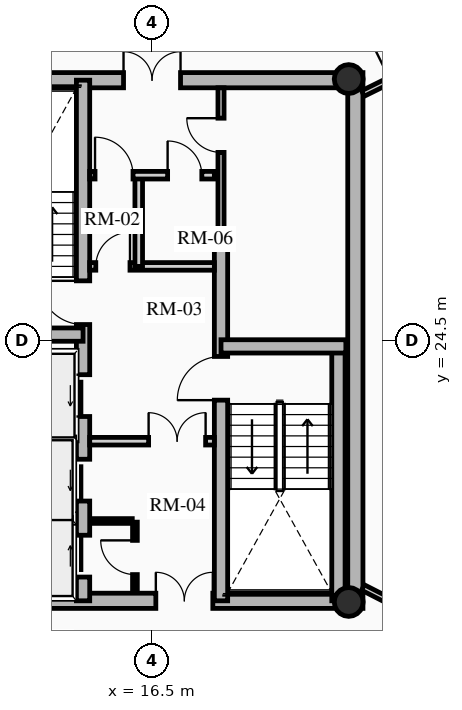
"""IFC4 building model, lengths in metres.
Left out: names, types, materials, properties, quantities, classifications, styles, units other than length and angle.
Written with IfcOpenShell. Run it as: python <this file> out.ifc"""

import sys

from ifc_helpers import new_model, si_unit, direction, frame, frame_2d, origin, origin_2d, place, context, subcontext, project, spatial, rectangle, hollow_circle, extrude, source, transform, mapped, element, fill, save


model = new_model("IFC4")
c1 = context("Model", 3, precision=1e-05, world=origin(), true_north=direction((0.0, 1.0)))
c2 = subcontext(c1, "Body", "Model", "MODEL_VIEW")
j1 = project(units=[si_unit("LENGTHUNIT", "METRE"), si_unit("PLANEANGLEUNIT", "RADIAN")], contexts=[c1])
p1 = place(None, origin())
s1 = spatial("IfcSite", under=j1, at=p1, CompositionType="ELEMENT")
p2 = place(p1, origin())
s2 = spatial("IfcBuilding", under=s1, at=p2, CompositionType="ELEMENT")
p3 = place(p2, frame((0.0, 0.0, 160.33)))
s3 = spatial("IfcBuildingStorey", under=s2, at=p3, CompositionType="ELEMENT", Elevation=160.33)
p4 = place(p3, frame((21.85, 17.45, 0.0), z_axis=(0.0, 0.0, 1.0), x_axis=(0.0, 1.0, 0.0)))
e1 = element("IfcWall", 1, at=p4, inside=s3, PredefinedType="SHEAR", context=c2, shape_type="SweptSolid", body=[
    extrude(rectangle(XDim=14.1, YDim=0.4, at=frame_2d((7.05, 0.0))), origin(), (0.0, 0.0, 1.0), 2.91),
])
p5 = place(p3, frame((11.15, 17.65, 0.0), z_axis=(0.0, 0.0, 1.0), x_axis=(1.0, 0.0, 0.0)))
e2 = element("IfcWall", 2, at=p5, inside=s3, PredefinedType="SHEAR", context=c2, shape_type="SweptSolid", body=[
    extrude(rectangle(XDim=10.7, YDim=0.4, at=frame_2d((5.35, 0.0))), origin(), (0.0, 0.0, 1.0), 2.91),
])
m1 = source(origin(), c2, "Body", "SweptSolid", [
    extrude(rectangle(XDim=1.5, YDim=2.02, at=frame_2d((0.75, 1.01))), frame((0.0, 0.21, 0.0), z_axis=(0.0, -1.0, 0.0), x_axis=(1.0, 0.0, 0.0)), (0.0, 0.0, 1.0), 0.42),
])
p6 = place(p5, frame((5.45, 0.0, 0.0)))
e3 = element("IfcOpeningElement", 3, at=p6, cuts=e2, PredefinedType="OPENING", context=c2, shape_type="MappedRepresentation", body=[
    mapped(m1, transform((0.0, 0.0, 0.0), x_axis=(1.0, 0.0, 0.0), y_axis=(0.0, 1.0, 0.0), z_axis=(0.0, 0.0, 1.0), scale=1.0)),
])
p7 = place(p3, frame((11.15, 31.35, 0.0), z_axis=(0.0, 0.0, 1.0), x_axis=(1.0, 0.0, 0.0)))
e4 = element("IfcWall", 4, at=p7, inside=s3, PredefinedType="SHEAR", context=c2, shape_type="SweptSolid", body=[
    extrude(rectangle(XDim=10.7, YDim=0.4, at=frame_2d((5.35, 0.0))), origin(), (0.0, 0.0, 1.0), 2.91),
])
p8 = place(p7, frame((4.6, 0.0, 0.0)))
e5 = element("IfcOpeningElement", 5, at=p8, cuts=e4, PredefinedType="OPENING", context=c2, shape_type="MappedRepresentation", body=[
    mapped(m1, transform((0.0, 0.0, 0.0), x_axis=(1.0, 0.0, 0.0), y_axis=(0.0, 1.0, 0.0), z_axis=(0.0, 0.0, 1.0), scale=1.0)),
])
p9 = place(p3, frame((14.685, 17.65, 0.0), z_axis=(0.0, 0.0, 1.0), x_axis=(0.0, 1.0, 0.0)))
e6 = element("IfcWall", 6, at=p9, inside=s3, PredefinedType="SHEAR", context=c2, shape_type="SweptSolid", body=[
    extrude(rectangle(XDim=13.7, YDim=0.35, at=frame_2d((6.85, 0.0))), origin(), (0.0, 0.0, 1.0), 2.91),
])
m2 = source(origin(), c2, "Body", "SweptSolid", [
    extrude(rectangle(XDim=1.1, YDim=2.015, at=frame_2d((0.55, 1.007))), frame((0.0, 0.185, 0.0), z_axis=(0.0, -1.0, 0.0), x_axis=(1.0, 0.0, 0.0)), (0.0, 0.0, 1.0), 0.37),
])
p10 = place(p9, frame((4.85, 0.0, 0.0)))
e7 = element("IfcOpeningElement", 7, at=p10, cuts=e6, PredefinedType="OPENING", context=c2, shape_type="MappedRepresentation", body=[
    mapped(m2, transform((0.0, 0.0, 0.0), x_axis=(1.0, 0.0, 0.0), y_axis=(0.0, 1.0, 0.0), z_axis=(0.0, 0.0, 1.0), scale=1.0)),
])
p11 = place(p9, frame((0.625, 0.0, 0.0)))
e8 = element("IfcOpeningElement", 8, at=p11, cuts=e6, PredefinedType="OPENING", context=c2, shape_type="MappedRepresentation", body=[
    mapped(m2, transform((0.0, 0.0, 0.0), x_axis=(1.0, 0.0, 0.0), y_axis=(0.0, 1.0, 0.0), z_axis=(0.0, 0.0, 1.0), scale=1.0)),
])
p12 = place(p9, frame((2.625, 0.0, 0.0)))
e9 = element("IfcOpeningElement", 9, at=p12, cuts=e6, PredefinedType="OPENING", context=c2, shape_type="MappedRepresentation", body=[
    mapped(m2, transform((0.0, 0.0, 0.0), x_axis=(1.0, 0.0, 0.0), y_axis=(0.0, 1.0, 0.0), z_axis=(0.0, 0.0, 1.0), scale=1.0)),
])
m3 = source(origin(), c2, "Body", "SweptSolid", [
    extrude(rectangle(XDim=1.15, YDim=2.02, at=frame_2d((0.575, 1.01))), frame((0.0, 0.185, 0.0), z_axis=(0.0, -1.0, 0.0), x_axis=(1.0, 0.0, 0.0)), (0.0, 0.0, 1.0), 0.37),
])
p13 = place(p9, frame((7.27, 0.0, 0.0)))
e10 = element("IfcOpeningElement", 10, at=p13, cuts=e6, PredefinedType="OPENING", context=c2, shape_type="MappedRepresentation", body=[
    mapped(m3, transform((0.0, 0.0, 0.0), x_axis=(1.0, 0.0, 0.0), y_axis=(0.0, 1.0, 0.0), z_axis=(0.0, 0.0, 1.0), scale=1.0)),
])
p14 = place(p3, frame((18.315, 17.65, 0.0), z_axis=(0.0, 0.0, 1.0), x_axis=(0.0, 1.0, 0.0)))
e11 = element("IfcWall", 11, at=p14, inside=s3, PredefinedType="SHEAR", context=c2, shape_type="SweptSolid", body=[
    extrude(rectangle(XDim=9.6, YDim=0.35, at=frame_2d((4.8, 0.0))), origin(), (0.0, 0.0, 1.0), 2.91),
])
p15 = place(p14, frame((5.28, 0.0, 0.0)))
e12 = element("IfcOpeningElement", 12, at=p15, cuts=e11, PredefinedType="OPENING", context=c2, shape_type="MappedRepresentation", body=[
    mapped(m3, transform((0.0, 0.0, 0.0), x_axis=(1.0, 0.0, 0.0), y_axis=(0.0, 1.0, 0.0), z_axis=(0.0, 0.0, 1.0), scale=1.0)),
])
p16 = place(p3, frame((11.4, 24.655, 0.0), z_axis=(0.0, 0.0, 1.0), x_axis=(1.0, 0.0, 0.0)))
e13 = element("IfcWall", 13, at=p16, inside=s3, PredefinedType="SHEAR", context=c2, shape_type="SweptSolid", body=[
    extrude(rectangle(XDim=3.285, YDim=0.35, at=frame_2d((1.643, 0.0))), origin(), (0.0, 0.0, 1.0), 2.91),
])
p17 = place(p3, frame((21.405, 17.65, 0.0), z_axis=(0.0, 0.0, 1.0), x_axis=(0.0, 1.0, 0.0)))
e14 = element("IfcWall", 14, at=p17, inside=s3, PredefinedType="SHEAR", context=c2, shape_type="SweptSolid", body=[
    extrude(rectangle(XDim=6.695, YDim=0.35, at=frame_2d((3.348, 0.0))), origin(), (0.0, 0.0, 1.0), 2.91),
])
p18 = place(p3, frame((18.315, 24.345, 0.0), z_axis=(0.0, 0.0, 1.0), x_axis=(1.0, 0.0, 0.0)))
e15 = element("IfcWall", 15, at=p18, inside=s3, PredefinedType="SHEAR", context=c2, shape_type="SweptSolid", body=[
    extrude(rectangle(XDim=3.285, YDim=0.35, at=frame_2d((1.643, 0.0))), origin(), (0.0, 0.0, 1.0), 2.91),
])
for number, where, z_axis, x_axis in (
    (16, (21.675, 17.62, 0.0), (0.0, 0.0, 1.0), (1.0, 0.0, 0.0)),
    (17, (21.675, 31.38, 0.0), (0.0, 0.0, 1.0), (1.0, 0.0, 0.0)),
):
    element("IfcColumn", number, at=place(p3, frame(where, z_axis=z_axis, x_axis=x_axis)), inside=s3, PredefinedType="COLUMN", context=c2, shape_type="SweptSolid", body=[
        extrude(hollow_circle(Radius=0.38, WallThickness=0.032, at=origin_2d()), origin(), (0.0, 0.0, 1.0), 2.91),
    ])
for number, where, z_axis, x_axis in (
    (18, (11.52, 21.8, 0.0), (0.0, 0.0, 1.0), (1.0, 0.0, 0.0)),
    (19, (11.52, 19.825, 0.0), (0.0, 0.0, 1.0), (1.0, 0.0, 0.0)),
):
    element("IfcWall", number, at=place(p3, frame(where, z_axis=z_axis, x_axis=x_axis)), inside=s3, PredefinedType="SHEAR", context=c2, shape_type="SweptSolid", body=[
        extrude(rectangle(XDim=2.97, YDim=0.2, at=frame_2d((1.485, 0.0))), origin(), (0.0, 0.0, 1.0), 2.91),
    ])
p19 = place(p3, frame((14.86, 21.85, 0.0), z_axis=(0.0, 0.0, 1.0), x_axis=(1.0, 0.0, 0.0)))
e20 = element("IfcWall", 20, at=p19, inside=s3, PredefinedType="PARTITIONING", context=c2, shape_type="SweptSolid", body=[
    extrude(rectangle(XDim=3.28, YDim=0.2, at=frame_2d((1.64, 0.0))), origin(), (0.0, 0.0, 1.0), 2.675),
])
m4 = source(origin(), c2, "Body", "SweptSolid", [
    extrude(rectangle(XDim=1.5, YDim=2.02, at=frame_2d((0.75, 1.01))), frame((0.0, 0.11, 0.0), z_axis=(0.0, -1.0, 0.0), x_axis=(1.0, 0.0, 0.0)), (0.0, 0.0, 1.0), 0.22),
])
p20 = place(p19, frame((1.55, 0.0, 0.0)))
e21 = element("IfcOpeningElement", 21, at=p20, cuts=e20, PredefinedType="OPENING", context=c2, shape_type="MappedRepresentation", body=[
    mapped(m4, transform((0.0, 0.0, 0.0), x_axis=(1.0, 0.0, 0.0), y_axis=(0.0, 1.0, 0.0), z_axis=(0.0, 0.0, 1.0), scale=1.0)),
])
p21 = place(p3, frame((14.86, 26.45, 0.0), z_axis=(0.0, 0.0, 1.0), x_axis=(1.0, 0.0, 0.0)))
e22 = element("IfcWall", 22, at=p21, inside=s3, PredefinedType="PARTITIONING", context=c2, shape_type="SweptSolid", body=[
    extrude(rectangle(XDim=3.28, YDim=0.2, at=frame_2d((1.64, 0.0))), origin(), (0.0, 0.0, 1.0), 2.675),
])
m5 = source(origin(), c2, "Body", "SweptSolid", [
    extrude(rectangle(XDim=0.9, YDim=2.005, at=frame_2d((0.45, 1.002))), frame((0.0, 0.11, 0.0), z_axis=(0.0, -1.0, 0.0), x_axis=(1.0, 0.0, 0.0)), (0.0, 0.0, 1.0), 0.22),
])
p22 = place(p21, frame((0.16, 0.0, 0.0)))
e23 = element("IfcOpeningElement", 23, at=p22, cuts=e22, PredefinedType="OPENING", context=c2, shape_type="MappedRepresentation", body=[
    mapped(m5, transform((0.0, 0.0, 0.0), x_axis=(1.0, 0.0, 0.0), y_axis=(0.0, 1.0, 0.0), z_axis=(0.0, 0.0, 1.0), scale=1.0)),
])
p23 = place(p3, frame((16.15, 26.45, 0.0), z_axis=(0.0, 0.0, 1.0), x_axis=(0.0, 1.0, 0.0)))
e24 = element("IfcWall", 24, at=p23, inside=s3, PredefinedType="PARTITIONING", context=c2, shape_type="SweptSolid", body=[
    extrude(rectangle(XDim=2.4, YDim=0.2, at=frame_2d((1.2, 0.0))), origin(), (0.0, 0.0, 1.0), 2.675),
])
p24 = place(p3, frame((14.86, 28.85, 0.0), z_axis=(0.0, 0.0, 1.0), x_axis=(1.0, 0.0, 0.0)))
e25 = element("IfcWall", 25, at=p24, inside=s3, PredefinedType="PARTITIONING", context=c2, shape_type="SweptSolid", body=[
    extrude(rectangle(XDim=3.28, YDim=0.2, at=frame_2d((1.64, 0.0))), origin(), (0.0, 0.0, 1.0), 2.675),
])
m6 = source(origin(), c2, "Body", "SweptSolid", [
    extrude(rectangle(XDim=1.0, YDim=2.015, at=frame_2d((0.5, 1.007))), frame((0.0, 0.11, 0.0), z_axis=(0.0, -1.0, 0.0), x_axis=(1.0, 0.0, 0.0)), (0.0, 0.0, 1.0), 0.22),
])
p25 = place(p24, frame((0.14, 0.0, 0.0)))
e26 = element("IfcOpeningElement", 26, at=p25, cuts=e25, PredefinedType="OPENING", context=c2, shape_type="MappedRepresentation", body=[
    mapped(m6, transform((0.0, 0.0, 0.0), x_axis=(1.0, 0.0, 0.0), y_axis=(0.0, 1.0, 0.0), z_axis=(0.0, 0.0, 1.0), scale=1.0)),
])
p26 = place(p24, frame((2.05, 0.0, 0.0)))
e27 = element("IfcOpeningElement", 27, at=p26, cuts=e25, PredefinedType="OPENING", context=c2, shape_type="MappedRepresentation", body=[
    mapped(m5, transform((0.0, 0.0, 0.0), x_axis=(1.0, 0.0, 0.0), y_axis=(0.0, 1.0, 0.0), z_axis=(0.0, 0.0, 1.0), scale=1.0)),
])
p27 = place(p3, frame((16.05, 17.92, 0.0), z_axis=(0.0, 0.0, 1.0), x_axis=(0.0, 1.0, 0.0)))
e28 = element("IfcWall", 28, at=p27, inside=s3, PredefinedType="PARTITIONING", context=c2, shape_type="SweptSolid", body=[
    extrude(rectangle(XDim=1.8, YDim=0.125, at=frame_2d((0.9, 0.0))), origin(), (0.0, 0.0, 1.0), 2.675),
])
m7 = source(origin(), c2, "Body", "SweptSolid", [
    extrude(rectangle(XDim=0.9, YDim=2.005, at=frame_2d((0.45, 1.002))), frame((0.0, 0.073, 0.0), z_axis=(0.0, -1.0, 0.0), x_axis=(1.0, 0.0, 0.0)), (0.0, 0.0, 1.0), 0.145),
])
p28 = place(p27, frame((0.42, 0.0, 0.0)))
e29 = element("IfcOpeningElement", 29, at=p28, cuts=e28, PredefinedType="OPENING", context=c2, shape_type="MappedRepresentation", body=[
    mapped(m7, transform((0.0, 0.0, 0.0), x_axis=(1.0, 0.0, 0.0), y_axis=(0.0, 1.0, 0.0), z_axis=(0.0, 0.0, 1.0), scale=1.0)),
])
p29 = place(p3, frame((14.88, 19.75, 0.0), z_axis=(0.0, 0.0, 1.0), x_axis=(1.0, 0.0, 0.0)))
e30 = element("IfcWall", 30, at=p29, inside=s3, PredefinedType="PARTITIONING", context=c2, shape_type="SweptSolid", body=[
    extrude(rectangle(XDim=1.1, YDim=0.125, at=frame_2d((0.55, 0.0))), origin(), (0.0, 0.0, 1.0), 2.675),
])
p30 = place(p3, frame((18.315, 27.25, 0.0), z_axis=(0.0, 0.0, 1.0), x_axis=(0.0, 1.0, 0.0)))
e31 = element("IfcWall", 31, at=p30, inside=s3, PredefinedType="PARTITIONING", context=c2, shape_type="SweptSolid", body=[
    extrude(rectangle(XDim=3.9, YDim=0.16, at=frame_2d((1.95, 0.0))), origin(), (0.0, 0.0, 1.0), 2.675),
])
m8 = source(origin(), c2, "Body", "SweptSolid", [
    extrude(rectangle(XDim=0.9, YDim=2.005, at=frame_2d((0.45, 1.002))), frame((0.0, 0.09, 0.0), z_axis=(0.0, -1.0, 0.0), x_axis=(1.0, 0.0, 0.0)), (0.0, 0.0, 1.0), 0.18),
])
p31 = place(p30, frame((2.2, 0.0, 0.0)))
e32 = element("IfcOpeningElement", 32, at=p31, cuts=e31, PredefinedType="OPENING", context=c2, shape_type="MappedRepresentation", body=[
    mapped(m8, transform((0.0, 0.0, 0.0), x_axis=(1.0, 0.0, 0.0), y_axis=(0.0, 1.0, 0.0), z_axis=(0.0, 0.0, 1.0), scale=1.0)),
])
p32 = place(p3, frame((22.05, 31.0, 0.0), z_axis=(0.0, 0.0, 1.0), x_axis=(0.896798317999, 0.442439574218, 0.0)))
e33 = element("IfcWall", 33, at=p32, inside=s3, PredefinedType="PARTITIONING", context=c2, shape_type="SweptSolid", body=[
    extrude(rectangle(XDim=2.048, YDim=0.16, at=frame_2d((1.024, 0.0))), origin(), (0.0, 0.0, 1.0), 2.245),
])
m9 = source(origin(), c2, "Body", "SweptSolid", [
    extrude(rectangle(XDim=1.05, YDim=2.015, at=frame_2d((0.525, 1.007))), frame((0.0, 0.09, 0.0), z_axis=(0.0, -1.0, 0.0), x_axis=(1.0, 0.0, 0.0)), (0.0, 0.0, 1.0), 0.18),
])
p33 = place(p32, frame((0.798, 0.0, 0.0)))
e34 = element("IfcOpeningElement", 34, at=p33, cuts=e33, PredefinedType="OPENING", context=c2, shape_type="MappedRepresentation", body=[
    mapped(m9, transform((0.0, 0.0, 0.0), x_axis=(1.0, 0.0, 0.0), y_axis=(0.0, 1.0, 0.0), z_axis=(0.0, 0.0, 1.0), scale=1.0)),
])
p34 = place(p3, frame((22.05, 18.0, 0.0), z_axis=(0.0, 0.0, 1.0), x_axis=(0.890660222535, -0.454669515136, 0.0)))
e35 = element("IfcWall", 35, at=p34, inside=s3, PredefinedType="PARTITIONING", context=c2, shape_type="SweptSolid", body=[
    extrude(rectangle(XDim=2.144, YDim=0.16, at=frame_2d((1.072, 0.0))), origin(), (0.0, 0.0, 1.0), 2.245),
])
p35 = place(p34, frame((0.894, 0.0, 0.0)))
e36 = element("IfcOpeningElement", 36, at=p35, cuts=e35, PredefinedType="OPENING", context=c2, shape_type="MappedRepresentation", body=[
    mapped(m9, transform((0.0, 0.0, 0.0), x_axis=(1.0, 0.0, 0.0), y_axis=(0.0, 1.0, 0.0), z_axis=(0.0, 0.0, 1.0), scale=1.0)),
])
m10 = source(origin(), c2, "Body", "SweptSolid", [
    extrude(rectangle(XDim=1.1, YDim=2.015, at=frame_2d((0.55, 1.007))), frame((0.0, 0.025, 0.0), z_axis=(0.0, -1.0, 0.0), x_axis=(1.0, 0.0, 0.0)), (0.0, 0.0, 1.0), 0.05),
])
p36 = place(p10, origin())
e37 = element("IfcDoor", 37, at=p36, inside=s3, OperationType="SLIDING_TO_LEFT", PredefinedType="DOOR", context=c2, shape_type="MappedRepresentation", body=[
    mapped(m10, transform((0.0, 0.0, 0.0), x_axis=(1.0, 0.0, 0.0), y_axis=(0.0, 1.0, 0.0), z_axis=(0.0, 0.0, 1.0), scale=1.0)),
])
fill(e7, e37)
p37 = place(p11, origin())
e38 = element("IfcDoor", 38, at=p37, inside=s3, OperationType="SLIDING_TO_RIGHT", PredefinedType="DOOR", context=c2, shape_type="MappedRepresentation", body=[
    mapped(m10, transform((0.0, 0.0, 0.0), x_axis=(1.0, 0.0, 0.0), y_axis=(0.0, 1.0, 0.0), z_axis=(0.0, 0.0, 1.0), scale=1.0)),
])
fill(e8, e38)
p38 = place(p12, origin())
e39 = element("IfcDoor", 39, at=p38, inside=s3, OperationType="SLIDING_TO_LEFT", PredefinedType="DOOR", context=c2, shape_type="MappedRepresentation", body=[
    mapped(m10, transform((0.0, 0.0, 0.0), x_axis=(1.0, 0.0, 0.0), y_axis=(0.0, 1.0, 0.0), z_axis=(0.0, 0.0, 1.0), scale=1.0)),
])
fill(e9, e39)
m11 = source(origin(), c2, "Body", "SweptSolid", [
    extrude(rectangle(XDim=1.15, YDim=2.02, at=frame_2d((0.575, 1.01))), frame((0.0, 0.025, 0.0), z_axis=(0.0, -1.0, 0.0), x_axis=(1.0, 0.0, 0.0)), (0.0, 0.0, 1.0), 0.05),
])
p39 = place(p13, origin())
e40 = element("IfcDoor", 40, at=p39, inside=s3, OperationType="SINGLE_SWING_RIGHT", PredefinedType="DOOR", context=c2, shape_type="MappedRepresentation", body=[
    mapped(m11, transform((0.0, 0.0, 0.0), x_axis=(1.0, 0.0, 0.0), y_axis=(0.0, 1.0, 0.0), z_axis=(0.0, 0.0, 1.0), scale=1.0)),
])
fill(e10, e40)
p40 = place(p15, origin())
e41 = element("IfcDoor", 41, at=p40, inside=s3, OperationType="SINGLE_SWING_LEFT", PredefinedType="DOOR", context=c2, shape_type="MappedRepresentation", body=[
    mapped(m11, transform((0.0, 0.0, 0.0), x_axis=(1.0, 0.0, 0.0), y_axis=(0.0, 1.0, 0.0), z_axis=(0.0, 0.0, 1.0), scale=1.0)),
])
fill(e12, e41)
m12 = source(origin(), c2, "Body", "SweptSolid", [
    extrude(rectangle(XDim=1.5, YDim=2.02, at=frame_2d((0.75, 1.01))), frame((0.0, 0.025, 0.0), z_axis=(0.0, -1.0, 0.0), x_axis=(1.0, 0.0, 0.0)), (0.0, 0.0, 1.0), 0.05),
])
p41 = place(p8, origin())
e42 = element("IfcDoor", 42, at=p41, inside=s3, OperationType="DOUBLE_DOOR_SINGLE_SWING", PredefinedType="DOOR", context=c2, shape_type="MappedRepresentation", body=[
    mapped(m12, transform((0.0, 0.0, 0.0), x_axis=(1.0, 0.0, 0.0), y_axis=(0.0, 1.0, 0.0), z_axis=(0.0, 0.0, 1.0), scale=1.0)),
])
fill(e5, e42)
p42 = place(p6, origin())
e43 = element("IfcDoor", 43, at=p42, inside=s3, OperationType="DOUBLE_DOOR_SINGLE_SWING", PredefinedType="DOOR", context=c2, shape_type="MappedRepresentation", body=[
    mapped(m12, transform((0.0, 0.0, 0.0), x_axis=(1.0, 0.0, 0.0), y_axis=(0.0, 1.0, 0.0), z_axis=(0.0, 0.0, 1.0), scale=1.0)),
])
fill(e3, e43)
p43 = place(p20, origin())
e44 = element("IfcDoor", 44, at=p43, inside=s3, OperationType="DOUBLE_DOOR_SINGLE_SWING", PredefinedType="DOOR", context=c2, shape_type="MappedRepresentation", body=[
    mapped(m12, transform((0.0, 0.0, 0.0), x_axis=(1.0, 0.0, 0.0), y_axis=(0.0, 1.0, 0.0), z_axis=(0.0, 0.0, 1.0), scale=1.0)),
])
fill(e21, e44)
m13 = source(origin(), c2, "Body", "SweptSolid", [
    extrude(rectangle(XDim=0.9, YDim=2.005, at=frame_2d((0.45, 1.002))), frame((0.0, 0.025, 0.0), z_axis=(0.0, -1.0, 0.0), x_axis=(1.0, 0.0, 0.0)), (0.0, 0.0, 1.0), 0.05),
])
p44 = place(p22, origin())
e45 = element("IfcDoor", 45, at=p44, inside=s3, OperationType="SINGLE_SWING_RIGHT", PredefinedType="DOOR", context=c2, shape_type="MappedRepresentation", body=[
    mapped(m13, transform((0.0, 0.0, 0.0), x_axis=(1.0, 0.0, 0.0), y_axis=(0.0, 1.0, 0.0), z_axis=(0.0, 0.0, 1.0), scale=1.0)),
])
fill(e23, e45)
m14 = source(origin(), c2, "Body", "SweptSolid", [
    extrude(rectangle(XDim=1.0, YDim=2.015, at=frame_2d((0.5, 1.007))), frame((0.0, 0.025, 0.0), z_axis=(0.0, -1.0, 0.0), x_axis=(1.0, 0.0, 0.0)), (0.0, 0.0, 1.0), 0.05),
])
p45 = place(p25, origin())
e46 = element("IfcDoor", 46, at=p45, inside=s3, OperationType="SINGLE_SWING_LEFT", PredefinedType="DOOR", context=c2, shape_type="MappedRepresentation", body=[
    mapped(m14, transform((0.0, 0.0, 0.0), x_axis=(1.0, 0.0, 0.0), y_axis=(0.0, 1.0, 0.0), z_axis=(0.0, 0.0, 1.0), scale=1.0)),
])
fill(e26, e46)
p46 = place(p28, origin())
e47 = element("IfcDoor", 47, at=p46, inside=s3, OperationType="SINGLE_SWING_RIGHT", PredefinedType="DOOR", context=c2, shape_type="MappedRepresentation", body=[
    mapped(m13, transform((0.0, 0.0, 0.0), x_axis=(1.0, 0.0, 0.0), y_axis=(0.0, 1.0, 0.0), z_axis=(0.0, 0.0, 1.0), scale=1.0)),
])
fill(e29, e47)
p47 = place(p26, origin())
e48 = element("IfcDoor", 48, at=p47, inside=s3, OperationType="SINGLE_SWING_LEFT", PredefinedType="DOOR", context=c2, shape_type="MappedRepresentation", body=[
    mapped(m13, transform((0.0, 0.0, 0.0), x_axis=(1.0, 0.0, 0.0), y_axis=(0.0, 1.0, 0.0), z_axis=(0.0, 0.0, 1.0), scale=1.0)),
])
fill(e27, e48)
p48 = place(p31, origin())
e49 = element("IfcDoor", 49, at=p48, inside=s3, OperationType="SINGLE_SWING_RIGHT", PredefinedType="DOOR", context=c2, shape_type="MappedRepresentation", body=[
    mapped(m13, transform((0.0, 0.0, 0.0), x_axis=(1.0, 0.0, 0.0), y_axis=(0.0, 1.0, 0.0), z_axis=(0.0, 0.0, 1.0), scale=1.0)),
])
fill(e32, e49)
save(model, sys.argv[1])
